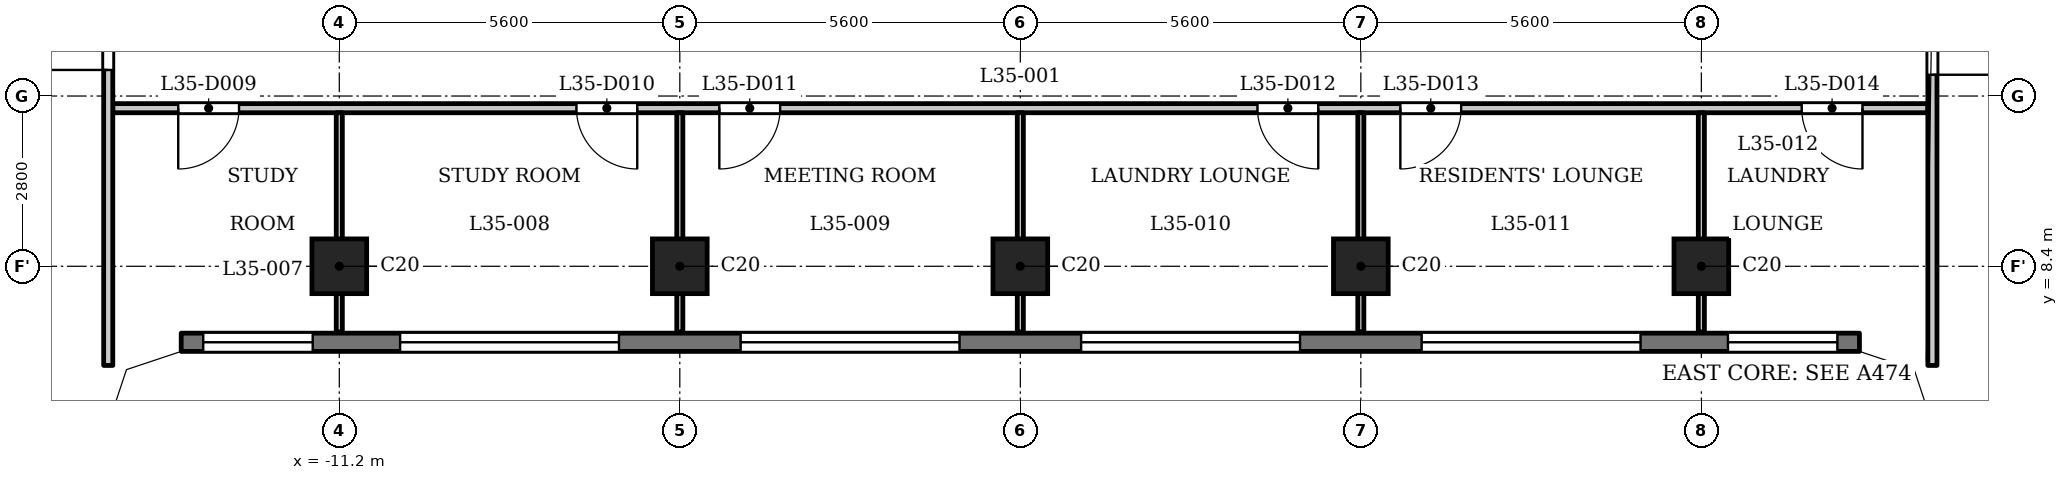
"""IFC4 building model, lengths in metres.
Left out: names, types, materials, properties, quantities, classifications, styles, units other than length and angle.
Written with IfcOpenShell. Run it as: python <this file> out.ifc"""

import sys

from ifc_helpers import new_model, si_unit, direction, frame, frame_2d, origin, origin_2d, place, context, subcontext, project, spatial, polyline, rectangle, outline, extrude, element, fill, save


model = new_model("IFC4")
c1 = context("Model", 3, precision=1e-05, world=origin(), true_north=direction((0.0, 1.0)))
c2 = subcontext(c1, "Body", "Model", "MODEL_VIEW")
j1 = project(units=[si_unit("LENGTHUNIT", "METRE"), si_unit("PLANEANGLEUNIT", "RADIAN")], contexts=[c1])
p1 = place(None, origin())
s1 = spatial("IfcSite", under=j1, at=p1, CompositionType="ELEMENT")
p2 = place(p1, origin())
s2 = spatial("IfcBuilding", under=s1, at=p2, CompositionType="ELEMENT")
p3 = place(p2, frame((0.0, 0.0, 139.6)))
s3 = spatial("IfcBuildingStorey", under=s2, at=p3, CompositionType="ELEMENT", Elevation=139.6)
for number, where, z_axis, x_axis in (
    (1, (-11.2, 8.4, 0.0), (0.0, 0.0, 1.0), (1.0, 0.0, 0.0)),
    (2, (-5.6, 8.4, 0.0), (0.0, 0.0, 1.0), (1.0, 0.0, 0.0)),
    (3, (0.0, 8.4, 0.0), (0.0, 0.0, 1.0), (1.0, 0.0, 0.0)),
    (4, (5.6, 8.4, 0.0), (0.0, 0.0, 1.0), (1.0, 0.0, 0.0)),
    (5, (11.2, 8.4, 0.0), (0.0, 0.0, 1.0), (1.0, 0.0, 0.0)),
):
    element("IfcColumn", number, at=place(p3, frame(where, z_axis=z_axis, x_axis=x_axis)), inside=s3, PredefinedType="COLUMN", context=c2, shape_type="SweptSolid", body=[
        extrude(rectangle(XDim=0.9, YDim=0.9, at=origin_2d()), origin(), (0.0, 0.0, 1.0), 3.5),
    ])
p4 = place(p3, frame((-13.8, 7.15, 0.0), z_axis=(0.0, 0.0, 1.0), x_axis=(1.0, 0.0, 0.0)))
e6 = element("IfcWall", 6, at=p4, inside=s3, PredefinedType="SOLIDWALL", context=c2, shape_type="SweptSolid", body=[
    extrude(rectangle(XDim=27.6, YDim=0.3, at=frame_2d((13.8, 0.0))), origin(), (0.0, 0.0, 1.0), 3.2),
])
p5 = place(p4, frame((0.363, 0.0, 0.9)))
e7 = element("IfcOpeningElement", 7, at=p5, cuts=e6, PredefinedType="OPENING", context=c2, shape_type="SweptSolid", body=[
    extrude(rectangle(XDim=1.8, YDim=1.25, at=frame_2d((0.9, 0.625))), frame((0.0, 0.16, 0.0), z_axis=(0.0, -1.0, 0.0), x_axis=(1.0, 0.0, 0.0)), (0.0, 0.0, 1.0), 0.32),
])
p6 = place(p4, frame((3.6, 0.0, 1.2)))
e8 = element("IfcOpeningElement", 8, at=p6, cuts=e6, PredefinedType="OPENING", context=c2, shape_type="SweptSolid", body=[
    extrude(rectangle(XDim=3.6, YDim=0.95, at=frame_2d((1.8, 0.475))), frame((0.0, 0.16, 0.0), z_axis=(0.0, -1.0, 0.0), x_axis=(1.0, 0.0, 0.0)), (0.0, 0.0, 1.0), 0.32),
])
p7 = place(p4, frame((9.2, 0.0, 1.2)))
e9 = element("IfcOpeningElement", 9, at=p7, cuts=e6, PredefinedType="OPENING", context=c2, shape_type="SweptSolid", body=[
    extrude(rectangle(XDim=3.6, YDim=0.95, at=frame_2d((1.8, 0.475))), frame((0.0, 0.16, 0.0), z_axis=(0.0, -1.0, 0.0), x_axis=(1.0, 0.0, 0.0)), (0.0, 0.0, 1.0), 0.32),
])
p8 = place(p4, frame((14.8, 0.0, 1.2)))
e10 = element("IfcOpeningElement", 10, at=p8, cuts=e6, PredefinedType="OPENING", context=c2, shape_type="SweptSolid", body=[
    extrude(rectangle(XDim=3.6, YDim=0.95, at=frame_2d((1.8, 0.475))), frame((0.0, 0.16, 0.0), z_axis=(0.0, -1.0, 0.0), x_axis=(1.0, 0.0, 0.0)), (0.0, 0.0, 1.0), 0.32),
])
p9 = place(p4, frame((20.4, 0.0, 1.2)))
e11 = element("IfcOpeningElement", 11, at=p9, cuts=e6, PredefinedType="OPENING", context=c2, shape_type="SweptSolid", body=[
    extrude(rectangle(XDim=3.6, YDim=0.95, at=frame_2d((1.8, 0.475))), frame((0.0, 0.16, 0.0), z_axis=(0.0, -1.0, 0.0), x_axis=(1.0, 0.0, 0.0)), (0.0, 0.0, 1.0), 0.32),
])
p10 = place(p4, frame((25.438, 0.0, 0.9)))
e12 = element("IfcOpeningElement", 12, at=p10, cuts=e6, PredefinedType="OPENING", context=c2, shape_type="SweptSolid", body=[
    extrude(rectangle(XDim=1.8, YDim=1.25, at=frame_2d((0.9, 0.625))), frame((0.0, 0.16, 0.0), z_axis=(0.0, -1.0, 0.0), x_axis=(1.0, 0.0, 0.0)), (0.0, 0.0, 1.0), 0.32),
])
p11 = place(p3, frame((-14.925, 11.0, 0.0), z_axis=(0.0, 0.0, 1.0), x_axis=(1.0, 0.0, 0.0)))
e13 = element("IfcWall", 13, at=p11, inside=s3, PredefinedType="PARTITIONING", context=c2, shape_type="SweptSolid", body=[
    extrude(rectangle(XDim=29.85, YDim=0.15, at=frame_2d((14.925, 0.0))), origin(), (0.0, 0.0, 1.0), 3.2),
])
p12 = place(p11, frame((1.076, 0.0, 0.0)))
e14 = element("IfcOpeningElement", 14, at=p12, cuts=e13, PredefinedType="OPENING", context=c2, shape_type="SweptSolid", body=[
    extrude(rectangle(XDim=1.0, YDim=2.1, at=frame_2d((0.5, 1.05))), frame((0.0, 0.085, 0.0), z_axis=(0.0, -1.0, 0.0), x_axis=(1.0, 0.0, 0.0)), (0.0, 0.0, 1.0), 0.17),
])
p13 = place(p11, frame((7.625, 0.0, 0.0)))
e15 = element("IfcOpeningElement", 15, at=p13, cuts=e13, PredefinedType="OPENING", context=c2, shape_type="SweptSolid", body=[
    extrude(rectangle(XDim=1.0, YDim=2.1, at=frame_2d((0.5, 1.05))), frame((0.0, 0.085, 0.0), z_axis=(0.0, -1.0, 0.0), x_axis=(1.0, 0.0, 0.0)), (0.0, 0.0, 1.0), 0.17),
])
p14 = place(p11, frame((9.975, 0.0, 0.0)))
e16 = element("IfcOpeningElement", 16, at=p14, cuts=e13, PredefinedType="OPENING", context=c2, shape_type="SweptSolid", body=[
    extrude(rectangle(XDim=1.0, YDim=2.1, at=frame_2d((0.5, 1.05))), frame((0.0, 0.085, 0.0), z_axis=(0.0, -1.0, 0.0), x_axis=(1.0, 0.0, 0.0)), (0.0, 0.0, 1.0), 0.17),
])
p15 = place(p11, frame((18.825, 0.0, 0.0)))
e17 = element("IfcOpeningElement", 17, at=p15, cuts=e13, PredefinedType="OPENING", context=c2, shape_type="SweptSolid", body=[
    extrude(rectangle(XDim=1.0, YDim=2.1, at=frame_2d((0.5, 1.05))), frame((0.0, 0.085, 0.0), z_axis=(0.0, -1.0, 0.0), x_axis=(1.0, 0.0, 0.0)), (0.0, 0.0, 1.0), 0.17),
])
p16 = place(p11, frame((21.175, 0.0, 0.0)))
e18 = element("IfcOpeningElement", 18, at=p16, cuts=e13, PredefinedType="OPENING", context=c2, shape_type="SweptSolid", body=[
    extrude(rectangle(XDim=1.0, YDim=2.1, at=frame_2d((0.5, 1.05))), frame((0.0, 0.085, 0.0), z_axis=(0.0, -1.0, 0.0), x_axis=(1.0, 0.0, 0.0)), (0.0, 0.0, 1.0), 0.17),
])
p17 = place(p11, frame((27.775, 0.0, 0.0)))
e19 = element("IfcOpeningElement", 19, at=p17, cuts=e13, PredefinedType="OPENING", context=c2, shape_type="SweptSolid", body=[
    extrude(rectangle(XDim=1.0, YDim=2.1, at=frame_2d((0.5, 1.05))), frame((0.0, 0.085, 0.0), z_axis=(0.0, -1.0, 0.0), x_axis=(1.0, 0.0, 0.0)), (0.0, 0.0, 1.0), 0.17),
])
p18 = place(p3, frame((-15.0, 6.769, 0.0), z_axis=(0.0, 0.0, 1.0), x_axis=(0.0, 1.0, 0.0)))
e20 = element("IfcWall", 20, at=p18, inside=s3, PredefinedType="PARTITIONING", context=c2, shape_type="SweptSolid", body=[
    extrude(rectangle(XDim=6.356, YDim=0.15, at=frame_2d((3.178, 0.0))), origin(), (0.0, 0.0, 1.0), 3.2),
])
p19 = place(p18, frame((4.86, 0.0, 0.0)))
e21 = element("IfcOpeningElement", 21, at=p19, cuts=e20, PredefinedType="OPENING", context=c2, shape_type="SweptSolid", body=[
    extrude(rectangle(XDim=1.0, YDim=2.1, at=frame_2d((0.5, 1.05))), frame((0.0, 0.085, 0.0), z_axis=(0.0, -1.0, 0.0), x_axis=(1.0, 0.0, 0.0)), (0.0, 0.0, 1.0), 0.17),
])
for number, where, z_axis, x_axis in (
    (22, (-11.2, 7.32, 0.0), (0.0, 0.0, 1.0), (0.0, 1.0, 0.0)),
    (23, (-5.6, 7.32, 0.0), (0.0, 0.0, 1.0), (0.0, 1.0, 0.0)),
    (24, (0.0, 7.32, 0.0), (0.0, 0.0, 1.0), (0.0, 1.0, 0.0)),
    (25, (5.6, 7.32, 0.0), (0.0, 0.0, 1.0), (0.0, 1.0, 0.0)),
    (26, (11.2, 7.32, 0.0), (0.0, 0.0, 1.0), (0.0, 1.0, 0.0)),
):
    element("IfcWall", number, at=place(p3, frame(where, z_axis=z_axis, x_axis=x_axis)), inside=s3, PredefinedType="PARTITIONING", context=c2, shape_type="SweptSolid", body=[
        extrude(rectangle(XDim=3.605, YDim=0.1, at=frame_2d((1.802, 0.0))), origin(), (0.0, 0.0, 1.0), 3.2),
    ])
p20 = place(p3, frame((15.0, 6.769, 0.0), z_axis=(0.0, 0.0, 1.0), x_axis=(0.0, 1.0, 0.0)))
e27 = element("IfcWall", 27, at=p20, inside=s3, PredefinedType="PARTITIONING", context=c2, shape_type="SweptSolid", body=[
    extrude(rectangle(XDim=6.356, YDim=0.15, at=frame_2d((3.178, 0.0))), origin(), (0.0, 0.0, 1.0), 3.2),
])
p21 = place(p20, frame((4.781, 0.0, 0.0)))
e28 = element("IfcOpeningElement", 28, at=p21, cuts=e27, PredefinedType="OPENING", context=c2, shape_type="SweptSolid", body=[
    extrude(rectangle(XDim=1.0, YDim=2.1, at=frame_2d((0.5, 1.05))), frame((0.0, 0.085, 0.0), z_axis=(0.0, -1.0, 0.0), x_axis=(1.0, 0.0, 0.0)), (0.0, 0.0, 1.0), 0.17),
])
p22 = place(p3, origin())
e29 = element("IfcWall", 29, at=p22, inside=s3, PredefinedType="SOLIDWALL", context=c2, shape_type="SweptSolid", body=[
    extrude(outline(polyline([(-13.849, 7.3), (-14.937, 6.937), (-15.3, 5.849), (-15.3, 5.8), (-15.0, 5.8), (-14.7, 6.7), (-13.8, 7.0), (-13.8, 7.3), (-13.849, 7.3)])), origin(), (0.0, 0.0, 1.0), 3.2),
])
e30 = element("IfcWall", 30, at=p22, inside=s3, PredefinedType="SOLIDWALL", context=c2, shape_type="SweptSolid", body=[
    extrude(outline(polyline([(14.937, 6.937), (13.849, 7.3), (13.8, 7.3), (13.8, 7.0), (14.7, 6.7), (15.0, 5.8), (15.3, 5.8), (15.3, 5.849), (14.937, 6.937)])), origin(), (0.0, 0.0, 1.0), 3.2),
])
p23 = place(p19, origin())
e31 = element("IfcDoor", 31, at=p23, inside=s3, OperationType="SINGLE_SWING_RIGHT", PredefinedType="DOOR", context=c2, shape_type="SweptSolid", body=[
    extrude(rectangle(XDim=1.0, YDim=2.1, at=frame_2d((0.5, 1.05))), frame((0.0, 0.025, 0.0), z_axis=(0.0, -1.0, 0.0), x_axis=(1.0, 0.0, 0.0)), (0.0, 0.0, 1.0), 0.05),
])
fill(e21, e31)
p24 = place(p21, origin())
e32 = element("IfcDoor", 32, at=p24, inside=s3, OperationType="SINGLE_SWING_LEFT", PredefinedType="DOOR", context=c2, shape_type="SweptSolid", body=[
    extrude(rectangle(XDim=1.0, YDim=2.1, at=frame_2d((0.5, 1.05))), frame((0.0, 0.025, 0.0), z_axis=(0.0, -1.0, 0.0), x_axis=(1.0, 0.0, 0.0)), (0.0, 0.0, 1.0), 0.05),
])
fill(e28, e32)
p25 = place(p12, origin())
e33 = element("IfcDoor", 33, at=p25, inside=s3, OperationType="SINGLE_SWING_LEFT", PredefinedType="DOOR", context=c2, shape_type="SweptSolid", body=[
    extrude(rectangle(XDim=1.0, YDim=2.1, at=frame_2d((0.5, 1.05))), frame((0.0, 0.025, 0.0), z_axis=(0.0, -1.0, 0.0), x_axis=(1.0, 0.0, 0.0)), (0.0, 0.0, 1.0), 0.05),
])
fill(e14, e33)
p26 = place(p13, origin())
e34 = element("IfcDoor", 34, at=p26, inside=s3, OperationType="SINGLE_SWING_RIGHT", PredefinedType="DOOR", context=c2, shape_type="SweptSolid", body=[
    extrude(rectangle(XDim=1.0, YDim=2.1, at=frame_2d((0.5, 1.05))), frame((0.0, 0.025, 0.0), z_axis=(0.0, -1.0, 0.0), x_axis=(1.0, 0.0, 0.0)), (0.0, 0.0, 1.0), 0.05),
])
fill(e15, e34)
p27 = place(p14, origin())
e35 = element("IfcDoor", 35, at=p27, inside=s3, OperationType="SINGLE_SWING_LEFT", PredefinedType="DOOR", context=c2, shape_type="SweptSolid", body=[
    extrude(rectangle(XDim=1.0, YDim=2.1, at=frame_2d((0.5, 1.05))), frame((0.0, 0.025, 0.0), z_axis=(0.0, -1.0, 0.0), x_axis=(1.0, 0.0, 0.0)), (0.0, 0.0, 1.0), 0.05),
])
fill(e16, e35)
p28 = place(p15, origin())
e36 = element("IfcDoor", 36, at=p28, inside=s3, OperationType="SINGLE_SWING_RIGHT", PredefinedType="DOOR", context=c2, shape_type="SweptSolid", body=[
    extrude(rectangle(XDim=1.0, YDim=2.1, at=frame_2d((0.5, 1.05))), frame((0.0, 0.025, 0.0), z_axis=(0.0, -1.0, 0.0), x_axis=(1.0, 0.0, 0.0)), (0.0, 0.0, 1.0), 0.05),
])
fill(e17, e36)
p29 = place(p16, origin())
e37 = element("IfcDoor", 37, at=p29, inside=s3, OperationType="SINGLE_SWING_LEFT", PredefinedType="DOOR", context=c2, shape_type="SweptSolid", body=[
    extrude(rectangle(XDim=1.0, YDim=2.1, at=frame_2d((0.5, 1.05))), frame((0.0, 0.025, 0.0), z_axis=(0.0, -1.0, 0.0), x_axis=(1.0, 0.0, 0.0)), (0.0, 0.0, 1.0), 0.05),
])
fill(e18, e37)
p30 = place(p17, origin())
e38 = element("IfcDoor", 38, at=p30, inside=s3, OperationType="SINGLE_SWING_RIGHT", PredefinedType="DOOR", context=c2, shape_type="SweptSolid", body=[
    extrude(rectangle(XDim=1.0, YDim=2.1, at=frame_2d((0.5, 1.05))), frame((0.0, 0.025, 0.0), z_axis=(0.0, -1.0, 0.0), x_axis=(1.0, 0.0, 0.0)), (0.0, 0.0, 1.0), 0.05),
])
fill(e19, e38)
p31 = place(p5, origin())
e39 = element("IfcWindow", 39, at=p31, inside=s3, PartitioningType="SINGLE_PANEL", PredefinedType="WINDOW", context=c2, shape_type="SweptSolid", body=[
    extrude(rectangle(XDim=1.8, YDim=1.25, at=frame_2d((0.9, 0.625))), frame((0.0, 0.03, 0.0), z_axis=(0.0, -1.0, 0.0), x_axis=(1.0, 0.0, 0.0)), (0.0, 0.0, 1.0), 0.06),
])
fill(e7, e39)
p32 = place(p6, origin())
e40 = element("IfcWindow", 40, at=p32, inside=s3, PartitioningType="SINGLE_PANEL", PredefinedType="WINDOW", context=c2, shape_type="SweptSolid", body=[
    extrude(rectangle(XDim=3.6, YDim=0.95, at=frame_2d((1.8, 0.475))), frame((0.0, 0.03, 0.0), z_axis=(0.0, -1.0, 0.0), x_axis=(1.0, 0.0, 0.0)), (0.0, 0.0, 1.0), 0.06),
])
fill(e8, e40)
p33 = place(p7, origin())
e41 = element("IfcWindow", 41, at=p33, inside=s3, PartitioningType="SINGLE_PANEL", PredefinedType="WINDOW", context=c2, shape_type="SweptSolid", body=[
    extrude(rectangle(XDim=3.6, YDim=0.95, at=frame_2d((1.8, 0.475))), frame((0.0, 0.03, 0.0), z_axis=(0.0, -1.0, 0.0), x_axis=(1.0, 0.0, 0.0)), (0.0, 0.0, 1.0), 0.06),
])
fill(e9, e41)
p34 = place(p8, origin())
e42 = element("IfcWindow", 42, at=p34, inside=s3, PartitioningType="SINGLE_PANEL", PredefinedType="WINDOW", context=c2, shape_type="SweptSolid", body=[
    extrude(rectangle(XDim=3.6, YDim=0.95, at=frame_2d((1.8, 0.475))), frame((0.0, 0.03, 0.0), z_axis=(0.0, -1.0, 0.0), x_axis=(1.0, 0.0, 0.0)), (0.0, 0.0, 1.0), 0.06),
])
fill(e10, e42)
p35 = place(p9, origin())
e43 = element("IfcWindow", 43, at=p35, inside=s3, PartitioningType="SINGLE_PANEL", PredefinedType="WINDOW", context=c2, shape_type="SweptSolid", body=[
    extrude(rectangle(XDim=3.6, YDim=0.95, at=frame_2d((1.8, 0.475))), frame((0.0, 0.03, 0.0), z_axis=(0.0, -1.0, 0.0), x_axis=(1.0, 0.0, 0.0)), (0.0, 0.0, 1.0), 0.06),
])
fill(e11, e43)
p36 = place(p10, origin())
e44 = element("IfcWindow", 44, at=p36, inside=s3, PartitioningType="SINGLE_PANEL", PredefinedType="WINDOW", context=c2, shape_type="SweptSolid", body=[
    extrude(rectangle(XDim=1.8, YDim=1.25, at=frame_2d((0.9, 0.625))), frame((0.0, 0.03, 0.0), z_axis=(0.0, -1.0, 0.0), x_axis=(1.0, 0.0, 0.0)), (0.0, 0.0, 1.0), 0.06),
])
fill(e12, e44)
save(model, sys.argv[1])
